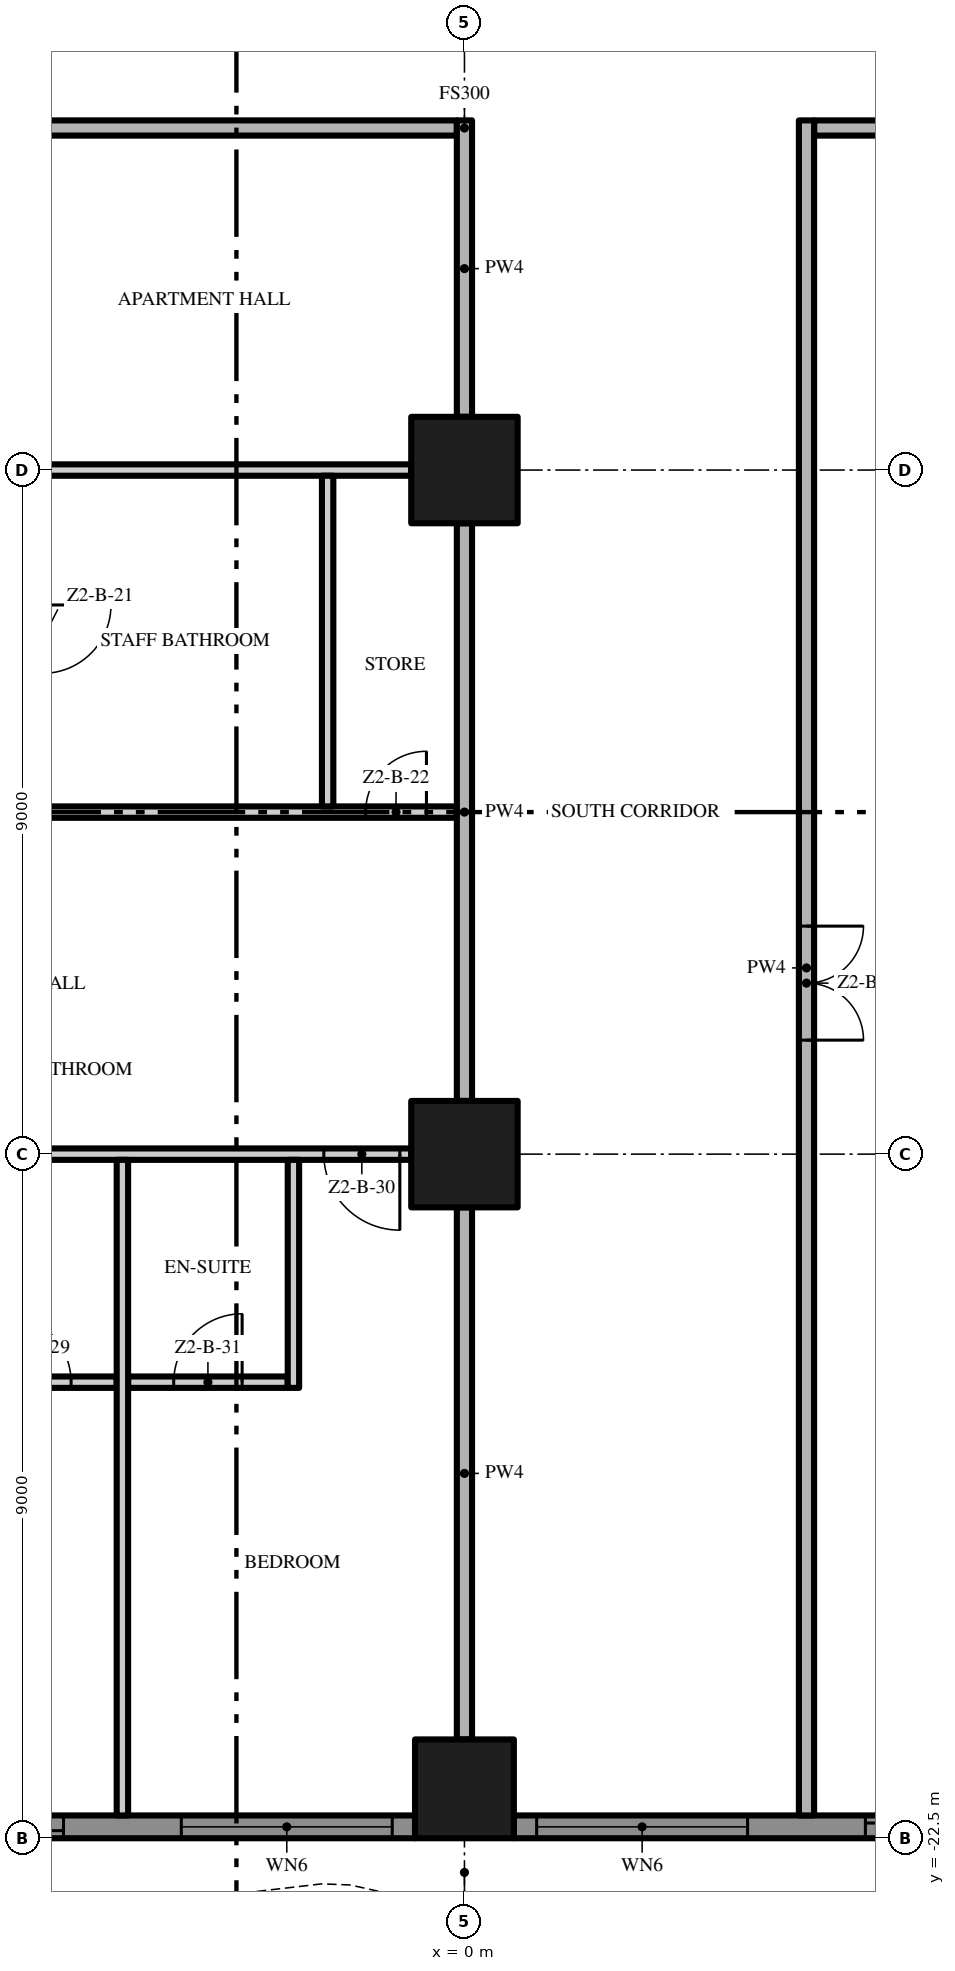
"""IFC4 building model, lengths in metres.
Left out: names, types, materials, properties, quantities, classifications, styles, units other than length and angle.
Written with IfcOpenShell. Run it as: python <this file> out.ifc"""

import sys

from ifc_helpers import new_model, si_unit, direction, frame, frame_2d, origin, origin_2d, place, context, subcontext, project, spatial, polyline, rectangle, outline, extrude, element, fill, save


model = new_model("IFC4")
c1 = context("Model", 3, precision=1e-05, world=origin(), true_north=direction((0.0, 1.0)))
c2 = subcontext(c1, "Body", "Model", "MODEL_VIEW")
j1 = project(units=[si_unit("LENGTHUNIT", "METRE"), si_unit("PLANEANGLEUNIT", "RADIAN")], contexts=[c1])
p1 = place(None, origin())
s1 = spatial("IfcSite", under=j1, at=p1, CompositionType="ELEMENT")
p2 = place(p1, origin())
s2 = spatial("IfcBuilding", under=s1, at=p2, CompositionType="ELEMENT")
p3 = place(p2, frame((0.0, 0.0, 88.4)))
s3 = spatial("IfcBuildingStorey", under=s2, at=p3, CompositionType="ELEMENT", Elevation=88.4)
p4 = place(p3, frame((0.0, -13.5, 0.0), z_axis=(0.0, 0.0, 1.0), x_axis=(1.0, 0.0, 0.0)))
e1 = element("IfcColumn", 1, at=p4, inside=s3, PredefinedType="COLUMN", context=c2, shape_type="SweptSolid", body=[
    extrude(rectangle(XDim=1.4, YDim=1.4, at=origin_2d()), origin(), (0.0, 0.0, 1.0), 3.5),
])
p5 = place(p3, frame((0.0, -21.85, 0.0), z_axis=(0.0, 0.0, 1.0), x_axis=(1.0, 0.0, 0.0)))
e2 = element("IfcColumn", 2, at=p5, inside=s3, PredefinedType="COLUMN", context=c2, shape_type="SweptSolid", body=[
    extrude(rectangle(XDim=1.3, YDim=1.3, at=origin_2d()), origin(), (0.0, 0.0, 1.0), 3.5),
])
p6 = place(p3, frame((0.0, -4.5, 0.0), z_axis=(0.0, 0.0, 1.0), x_axis=(1.0, 0.0, 0.0)))
e3 = element("IfcColumn", 3, at=p6, inside=s3, PredefinedType="COLUMN", context=c2, shape_type="SweptSolid", body=[
    extrude(rectangle(XDim=1.4, YDim=1.4, at=origin_2d()), origin(), (0.0, 0.0, 1.0), 3.5),
])
p7 = place(p3, frame((-0.65, -22.35, 0.0), z_axis=(0.0, 0.0, 1.0), x_axis=(-1.0, 0.0, 0.0)))
e4 = element("IfcWall", 4, at=p7, inside=s3, PredefinedType="SOLIDWALL", context=c2, shape_type="SweptSolid", body=[
    extrude(rectangle(XDim=7.7, YDim=0.3, at=frame_2d((3.85, 0.0))), origin(), (0.0, 0.0, 1.0), 3.5),
])
p8 = place(p7, frame((4.625, 0.0, 0.0)))
e5 = element("IfcOpeningElement", 5, at=p8, cuts=e4, PredefinedType="OPENING", context=c2, shape_type="SweptSolid", body=[
    extrude(rectangle(XDim=2.775, YDim=2.4, at=frame_2d((1.387, 1.2))), frame((0.0, 0.16, 0.0), z_axis=(0.0, -1.0, 0.0), x_axis=(1.0, 0.0, 0.0)), (0.0, 0.0, 1.0), 0.32),
])
p9 = place(p7, frame((0.3, 0.0, 0.45)))
e6 = element("IfcOpeningElement", 6, at=p9, cuts=e4, PredefinedType="OPENING", context=c2, shape_type="SweptSolid", body=[
    extrude(rectangle(XDim=2.775, YDim=2.65, at=frame_2d((1.387, 1.325))), frame((0.0, 0.16, 0.0), z_axis=(0.0, -1.0, 0.0), x_axis=(1.0, 0.0, 0.0)), (0.0, 0.0, 1.0), 0.32),
])
p10 = place(p3, frame((8.35, -22.35, 0.0), z_axis=(0.0, 0.0, 1.0), x_axis=(-1.0, 0.0, 0.0)))
e7 = element("IfcWall", 7, at=p10, inside=s3, PredefinedType="SOLIDWALL", context=c2, shape_type="SweptSolid", body=[
    extrude(rectangle(XDim=7.7, YDim=0.3, at=frame_2d((3.85, 0.0))), origin(), (0.0, 0.0, 1.0), 3.5),
])
p11 = place(p10, frame((4.625, 0.0, 0.45)))
e8 = element("IfcOpeningElement", 8, at=p11, cuts=e7, PredefinedType="OPENING", context=c2, shape_type="SweptSolid", body=[
    extrude(rectangle(XDim=2.775, YDim=2.65, at=frame_2d((1.387, 1.325))), frame((0.0, 0.16, 0.0), z_axis=(0.0, -1.0, 0.0), x_axis=(1.0, 0.0, 0.0)), (0.0, 0.0, 1.0), 0.32),
])
p12 = place(p10, frame((0.3, 0.0, 0.0)))
e9 = element("IfcOpeningElement", 9, at=p12, cuts=e7, PredefinedType="OPENING", context=c2, shape_type="SweptSolid", body=[
    extrude(rectangle(XDim=2.775, YDim=2.4, at=frame_2d((1.387, 1.2))), frame((0.0, 0.16, 0.0), z_axis=(0.0, -1.0, 0.0), x_axis=(1.0, 0.0, 0.0)), (0.0, 0.0, 1.0), 0.32),
])
p13 = place(p3, origin())
e10 = element("IfcWall", 10, at=p13, inside=s3, PredefinedType="USERDEFINED", context=c2, shape_type="SweptSolid", body=[
    extrude(outline(polyline([(-22.5, -25.149), (-21.0, -24.488), (-19.5, -23.755), (-18.0, -23.231), (-16.875, -23.1), (-16.5, -23.115), (-15.0, -23.451), (-13.5, -24.112), (-12.0, -24.845), (-10.5, -25.369), (-9.375, -25.5), (-9.0, -25.485), (-7.5, -25.149), (-6.0, -24.488), (-4.5, -23.755), (-3.0, -23.231), (-1.875, -23.1), (-1.5, -23.115), (0.0, -23.451), (1.5, -24.112), (3.0, -24.845), (4.5, -25.369), (5.625, -25.5), (6.0, -25.485), (7.5, -25.149), (9.0, -24.488), (10.5, -23.755), (12.0, -23.231), (13.125, -23.1), (13.5, -23.115), (15.0, -23.451), (16.5, -24.112), (18.0, -24.845), (19.5, -25.369), (20.625, -25.5), (21.0, -25.485), (22.5, -25.149), (22.445, -24.905), (20.967, -25.236), (20.635, -25.249), (19.556, -25.124), (18.096, -24.614), (16.605, -23.885), (15.079, -23.213), (13.533, -22.866), (13.115, -22.849), (11.944, -22.986), (10.404, -23.524), (8.895, -24.261), (7.421, -24.91), (5.967, -25.236), (5.635, -25.249), (4.556, -25.124), (3.096, -24.614), (1.605, -23.885), (0.079, -23.213), (-1.467, -22.866), (-1.885, -22.849), (-3.056, -22.986), (-4.596, -23.524), (-6.105, -24.261), (-7.579, -24.91), (-9.033, -25.236), (-9.365, -25.249), (-10.444, -25.124), (-11.904, -24.614), (-13.395, -23.885), (-14.921, -23.213), (-16.467, -22.866), (-16.885, -22.849), (-18.056, -22.986), (-19.596, -23.524), (-21.105, -24.261), (-22.601, -24.92), (-22.5, -25.149)])), origin(), (0.0, 0.0, 1.0), 0.9),
])
p14 = place(p3, frame((-6.675, -16.5, 0.0), z_axis=(0.0, 0.0, 1.0), x_axis=(1.0, 0.0, 0.0)))
e11 = element("IfcWall", 11, at=p14, inside=s3, PredefinedType="PARTITIONING", context=c2, shape_type="SweptSolid", body=[
    extrude(rectangle(XDim=2.1, YDim=0.15, at=frame_2d((1.05, 0.0))), origin(), (0.0, 0.0, 1.0), 3.5),
])
p15 = place(p14, frame((0.6, 0.0, 0.0)))
e12 = element("IfcOpeningElement", 12, at=p15, cuts=e11, PredefinedType="OPENING", context=c2, shape_type="SweptSolid", body=[
    extrude(rectangle(XDim=0.9, YDim=2.1, at=frame_2d((0.45, 1.05))), frame((0.0, 0.085, 0.0), z_axis=(0.0, -1.0, 0.0), x_axis=(1.0, 0.0, 0.0)), (0.0, 0.0, 1.0), 0.17),
])
p16 = place(p3, frame((-4.425, -16.5, 0.0), z_axis=(0.0, 0.0, 1.0), x_axis=(1.0, 0.0, 0.0)))
e13 = element("IfcWall", 13, at=p16, inside=s3, PredefinedType="PARTITIONING", context=c2, shape_type="SweptSolid", body=[
    extrude(rectangle(XDim=2.1, YDim=0.15, at=frame_2d((1.05, 0.0))), origin(), (0.0, 0.0, 1.0), 3.5),
])
p17 = place(p16, frame((0.6, 0.0, 0.0)))
e14 = element("IfcOpeningElement", 14, at=p17, cuts=e13, PredefinedType="OPENING", context=c2, shape_type="SweptSolid", body=[
    extrude(rectangle(XDim=0.9, YDim=2.1, at=frame_2d((0.45, 1.05))), frame((0.0, 0.085, 0.0), z_axis=(0.0, -1.0, 0.0), x_axis=(1.0, 0.0, 0.0)), (0.0, 0.0, 1.0), 0.17),
])
p18 = place(p3, frame((-0.7, -13.5, 0.0), z_axis=(0.0, 0.0, 1.0), x_axis=(-1.0, 0.0, 0.0)))
e15 = element("IfcWall", 15, at=p18, inside=s3, PredefinedType="PARTITIONING", context=c2, shape_type="SweptSolid", body=[
    extrude(rectangle(XDim=7.6, YDim=0.15, at=frame_2d((3.8, 0.0))), origin(), (0.0, 0.0, 1.0), 3.5),
])
p19 = place(p18, frame((6.45, 0.0, 0.0)))
e16 = element("IfcOpeningElement", 16, at=p19, cuts=e15, PredefinedType="OPENING", context=c2, shape_type="SweptSolid", body=[
    extrude(rectangle(XDim=1.0, YDim=2.4, at=frame_2d((0.5, 1.2))), frame((0.0, 0.085, 0.0), z_axis=(0.0, -1.0, 0.0), x_axis=(1.0, 0.0, 0.0)), (0.0, 0.0, 1.0), 0.17),
])
p20 = place(p18, frame((0.15, 0.0, 0.0)))
e17 = element("IfcOpeningElement", 17, at=p20, cuts=e15, PredefinedType="OPENING", context=c2, shape_type="SweptSolid", body=[
    extrude(rectangle(XDim=1.0, YDim=2.4, at=frame_2d((0.5, 1.2))), frame((0.0, 0.085, 0.0), z_axis=(0.0, -1.0, 0.0), x_axis=(1.0, 0.0, 0.0)), (0.0, 0.0, 1.0), 0.17),
])
p21 = place(p3, frame((-10.725, -9.0, 0.0), z_axis=(0.0, 0.0, 1.0), x_axis=(1.0, 0.0, 0.0)))
e18 = element("IfcWall", 18, at=p21, inside=s3, PredefinedType="PARTITIONING", context=c2, shape_type="SweptSolid", body=[
    extrude(rectangle(XDim=10.625, YDim=0.15, at=frame_2d((5.312, 0.0))), origin(), (0.0, 0.0, 1.0), 3.5),
])
p22 = place(p21, frame((2.1, 0.0, 0.0)))
e19 = element("IfcOpeningElement", 19, at=p22, cuts=e18, PredefinedType="OPENING", context=c2, shape_type="SweptSolid", body=[
    extrude(rectangle(XDim=0.9, YDim=2.1, at=frame_2d((0.45, 1.05))), frame((0.0, 0.085, 0.0), z_axis=(0.0, -1.0, 0.0), x_axis=(1.0, 0.0, 0.0)), (0.0, 0.0, 1.0), 0.17),
])
p23 = place(p21, frame((9.425, 0.0, 0.0)))
e20 = element("IfcOpeningElement", 20, at=p23, cuts=e18, PredefinedType="OPENING", context=c2, shape_type="SweptSolid", body=[
    extrude(rectangle(XDim=0.8, YDim=2.0, at=frame_2d((0.4, 1.0))), frame((0.0, 0.085, 0.0), z_axis=(0.0, -1.0, 0.0), x_axis=(1.0, 0.0, 0.0)), (0.0, 0.0, 1.0), 0.17),
])
p24 = place(p3, frame((-8.3, -4.5, 0.0), z_axis=(0.0, 0.0, 1.0), x_axis=(1.0, 0.0, 0.0)))
e21 = element("IfcWall", 21, at=p24, inside=s3, PredefinedType="PARTITIONING", context=c2, shape_type="SweptSolid", body=[
    extrude(rectangle(XDim=7.6, YDim=0.15, at=frame_2d((3.8, 0.0))), origin(), (0.0, 0.0, 1.0), 3.5),
])
p25 = place(p3, frame((-0.1, 0.0, 0.0), z_axis=(0.0, 0.0, 1.0), x_axis=(-1.0, 0.0, 0.0)))
e22 = element("IfcWall", 22, at=p25, inside=s3, PredefinedType="PARTITIONING", context=c2, shape_type="SweptSolid", body=[
    extrude(rectangle(XDim=17.3, YDim=0.2, at=frame_2d((8.65, 0.0))), origin(), (0.0, 0.0, 1.0), 3.5),
])
p26 = place(p25, frame((8.15, 0.0, 0.0)))
e23 = element("IfcOpeningElement", 23, at=p26, cuts=e22, PredefinedType="OPENING", context=c2, shape_type="SweptSolid", body=[
    extrude(rectangle(XDim=1.5, YDim=2.4, at=frame_2d((0.75, 1.2))), frame((0.0, 0.11, 0.0), z_axis=(0.0, -1.0, 0.0), x_axis=(1.0, 0.0, 0.0)), (0.0, 0.0, 1.0), 0.22),
])
p27 = place(p3, frame((4.6, 0.0, 0.0), z_axis=(0.0, 0.0, 1.0), x_axis=(1.0, 0.0, 0.0)))
e24 = element("IfcWall", 24, at=p27, inside=s3, PredefinedType="PARTITIONING", context=c2, shape_type="SweptSolid", body=[
    extrude(rectangle(XDim=12.8, YDim=0.2, at=frame_2d((6.4, 0.0))), origin(), (0.0, 0.0, 1.0), 3.5),
])
p28 = place(p3, frame((-4.5, -22.2, 0.0), z_axis=(0.0, 0.0, 1.0), x_axis=(0.0, 1.0, 0.0)))
e25 = element("IfcWall", 25, at=p28, inside=s3, PredefinedType="PARTITIONING", context=c2, shape_type="SweptSolid", body=[
    extrude(rectangle(XDim=8.625, YDim=0.15, at=frame_2d((4.312, 0.0))), origin(), (0.0, 0.0, 1.0), 3.5),
])
p29 = place(p3, frame((-2.25, -16.575, 0.0), z_axis=(0.0, 0.0, 1.0), x_axis=(0.0, 1.0, 0.0)))
e26 = element("IfcWall", 26, at=p29, inside=s3, PredefinedType="PARTITIONING", context=c2, shape_type="SweptSolid", body=[
    extrude(rectangle(XDim=3.0, YDim=0.15, at=frame_2d((1.5, 0.0))), origin(), (0.0, 0.0, 1.0), 3.5),
])
p30 = place(p3, frame((-1.8, -8.925, 0.0), z_axis=(0.0, 0.0, 1.0), x_axis=(0.0, 1.0, 0.0)))
e27 = element("IfcWall", 27, at=p30, inside=s3, PredefinedType="PARTITIONING", context=c2, shape_type="SweptSolid", body=[
    extrude(rectangle(XDim=4.35, YDim=0.15, at=frame_2d((2.175, 0.0))), origin(), (0.0, 0.0, 1.0), 3.5),
])
p31 = place(p3, frame((0.0, -21.2, 0.0), z_axis=(0.0, 0.0, 1.0), x_axis=(0.0, 1.0, 0.0)))
e28 = element("IfcWall", 28, at=p31, inside=s3, PredefinedType="PARTITIONING", context=c2, shape_type="SweptSolid", body=[
    extrude(rectangle(XDim=7.0, YDim=0.2, at=frame_2d((3.5, 0.0))), origin(), (0.0, 0.0, 1.0), 3.5),
])
p32 = place(p3, frame((0.0, -12.8, 0.0), z_axis=(0.0, 0.0, 1.0), x_axis=(0.0, 1.0, 0.0)))
e29 = element("IfcWall", 29, at=p32, inside=s3, PredefinedType="PARTITIONING", context=c2, shape_type="SweptSolid", body=[
    extrude(rectangle(XDim=7.6, YDim=0.2, at=frame_2d((3.8, 0.0))), origin(), (0.0, 0.0, 1.0), 3.5),
])
p33 = place(p3, frame((0.0, -3.8, 0.0), z_axis=(0.0, 0.0, 1.0), x_axis=(0.0, 1.0, 0.0)))
e30 = element("IfcWall", 30, at=p33, inside=s3, PredefinedType="PARTITIONING", context=c2, shape_type="SweptSolid", body=[
    extrude(rectangle(XDim=3.9, YDim=0.2, at=frame_2d((1.95, 0.0))), origin(), (0.0, 0.0, 1.0), 3.5),
])
p34 = place(p3, frame((4.5, 0.1, 0.0), z_axis=(0.0, 0.0, 1.0), x_axis=(0.0, -1.0, 0.0)))
e31 = element("IfcWall", 31, at=p34, inside=s3, PredefinedType="PARTITIONING", context=c2, shape_type="SweptSolid", body=[
    extrude(rectangle(XDim=22.3, YDim=0.2, at=frame_2d((11.15, 0.0))), origin(), (0.0, 0.0, 1.0), 3.5),
])
p35 = place(p34, frame((10.6, 0.0, 0.0)))
e32 = element("IfcOpeningElement", 32, at=p35, cuts=e31, PredefinedType="OPENING", context=c2, shape_type="SweptSolid", body=[
    extrude(rectangle(XDim=1.5, YDim=2.4, at=frame_2d((0.75, 1.2))), frame((0.0, 0.11, 0.0), z_axis=(0.0, -1.0, 0.0), x_axis=(1.0, 0.0, 0.0)), (0.0, 0.0, 1.0), 0.22),
])
p36 = place(p8, origin())
e33 = element("IfcDoor", 33, at=p36, inside=s3, OperationType="SINGLE_SWING_LEFT", PredefinedType="DOOR", context=c2, shape_type="SweptSolid", body=[
    extrude(rectangle(XDim=2.775, YDim=2.4, at=frame_2d((1.387, 1.2))), frame((0.0, 0.025, 0.0), z_axis=(0.0, -1.0, 0.0), x_axis=(1.0, 0.0, 0.0)), (0.0, 0.0, 1.0), 0.05),
])
fill(e5, e33)
p37 = place(p9, origin())
e34 = element("IfcWindow", 34, at=p37, inside=s3, PartitioningType="SINGLE_PANEL", PredefinedType="WINDOW", context=c2, shape_type="SweptSolid", body=[
    extrude(rectangle(XDim=2.775, YDim=2.65, at=frame_2d((1.387, 1.325))), frame((0.0, 0.03, 0.0), z_axis=(0.0, -1.0, 0.0), x_axis=(1.0, 0.0, 0.0)), (0.0, 0.0, 1.0), 0.06),
])
fill(e6, e34)
p38 = place(p11, origin())
e35 = element("IfcWindow", 35, at=p38, inside=s3, PartitioningType="SINGLE_PANEL", PredefinedType="WINDOW", context=c2, shape_type="SweptSolid", body=[
    extrude(rectangle(XDim=2.775, YDim=2.65, at=frame_2d((1.387, 1.325))), frame((0.0, 0.03, 0.0), z_axis=(0.0, -1.0, 0.0), x_axis=(1.0, 0.0, 0.0)), (0.0, 0.0, 1.0), 0.06),
])
fill(e8, e35)
p39 = place(p12, origin())
e36 = element("IfcDoor", 36, at=p39, inside=s3, OperationType="SINGLE_SWING_LEFT", PredefinedType="DOOR", context=c2, shape_type="SweptSolid", body=[
    extrude(rectangle(XDim=2.775, YDim=2.4, at=frame_2d((1.387, 1.2))), frame((0.0, 0.025, 0.0), z_axis=(0.0, -1.0, 0.0), x_axis=(1.0, 0.0, 0.0)), (0.0, 0.0, 1.0), 0.05),
])
fill(e9, e36)
p40 = place(p23, origin())
e37 = element("IfcDoor", 37, at=p40, inside=s3, OperationType="SINGLE_SWING_RIGHT", PredefinedType="DOOR", context=c2, shape_type="SweptSolid", body=[
    extrude(rectangle(XDim=0.8, YDim=2.0, at=frame_2d((0.4, 1.0))), frame((0.0, 0.025, 0.0), z_axis=(0.0, -1.0, 0.0), x_axis=(1.0, 0.0, 0.0)), (0.0, 0.0, 1.0), 0.05),
])
fill(e20, e37)
p41 = place(p15, origin())
e38 = element("IfcDoor", 38, at=p41, inside=s3, OperationType="SINGLE_SWING_LEFT", PredefinedType="DOOR", context=c2, shape_type="SweptSolid", body=[
    extrude(rectangle(XDim=0.9, YDim=2.1, at=frame_2d((0.45, 1.05))), frame((0.0, 0.025, 0.0), z_axis=(0.0, -1.0, 0.0), x_axis=(1.0, 0.0, 0.0)), (0.0, 0.0, 1.0), 0.05),
])
fill(e12, e38)
p42 = place(p20, origin())
e39 = element("IfcDoor", 39, at=p42, inside=s3, OperationType="SINGLE_SWING_LEFT", PredefinedType="DOOR", context=c2, shape_type="SweptSolid", body=[
    extrude(rectangle(XDim=1.0, YDim=2.4, at=frame_2d((0.5, 1.2))), frame((0.0, 0.025, 0.0), z_axis=(0.0, -1.0, 0.0), x_axis=(1.0, 0.0, 0.0)), (0.0, 0.0, 1.0), 0.05),
])
fill(e17, e39)
p43 = place(p17, origin())
e40 = element("IfcDoor", 40, at=p43, inside=s3, OperationType="SINGLE_SWING_RIGHT", PredefinedType="DOOR", context=c2, shape_type="SweptSolid", body=[
    extrude(rectangle(XDim=0.9, YDim=2.1, at=frame_2d((0.45, 1.05))), frame((0.0, 0.025, 0.0), z_axis=(0.0, -1.0, 0.0), x_axis=(1.0, 0.0, 0.0)), (0.0, 0.0, 1.0), 0.05),
])
fill(e14, e40)
p44 = place(p35, origin())
e41 = element("IfcDoor", 41, at=p44, inside=s3, OperationType="DOUBLE_DOOR_SINGLE_SWING", PredefinedType="DOOR", context=c2, shape_type="SweptSolid", body=[
    extrude(rectangle(XDim=1.5, YDim=2.4, at=frame_2d((0.75, 1.2))), frame((0.0, 0.025, 0.0), z_axis=(0.0, -1.0, 0.0), x_axis=(1.0, 0.0, 0.0)), (0.0, 0.0, 1.0), 0.05),
])
fill(e32, e41)
save(model, sys.argv[1])
